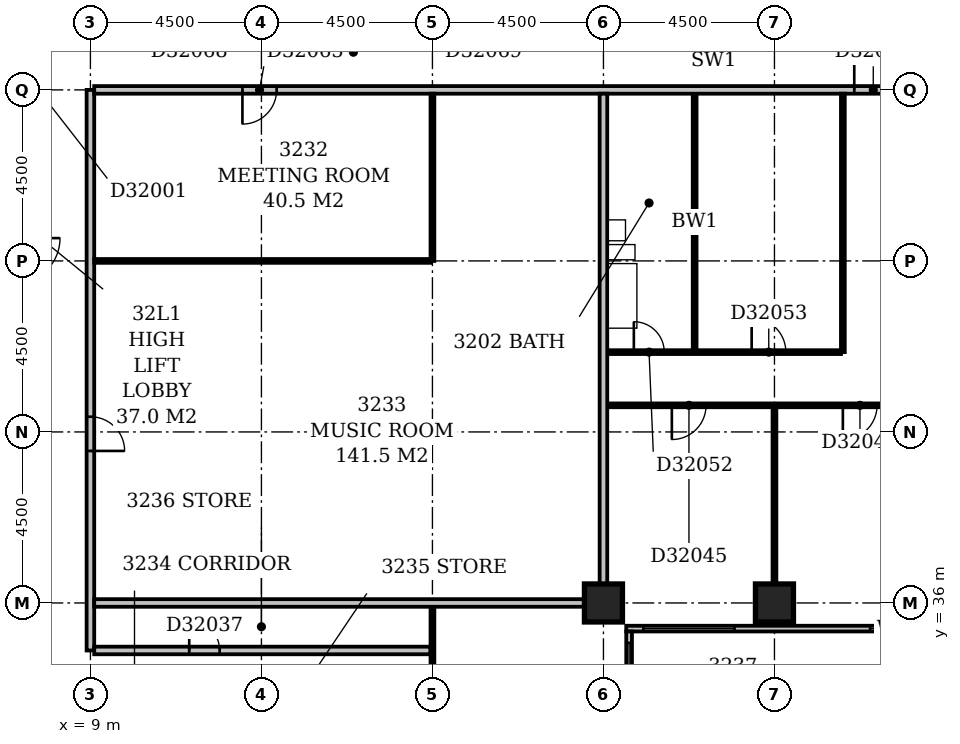
"""IFC4 building model, lengths in metres.
Left out: names, types, materials, properties, quantities, classifications, styles, units other than length and angle.
Written with IfcOpenShell. Run it as: python <this file> out.ifc"""

import sys

from ifc_helpers import new_model, si_unit, direction, frame, frame_2d, origin, origin_2d, place, context, subcontext, project, spatial, rectangle, extrude, element, fill, save


model = new_model("IFC4")
c1 = context("Model", 3, precision=1e-05, world=origin(), true_north=direction((0.0, 1.0)))
c2 = subcontext(c1, "Body", "Model", "MODEL_VIEW")
j1 = project(units=[si_unit("LENGTHUNIT", "METRE"), si_unit("PLANEANGLEUNIT", "RADIAN")], contexts=[c1])
p1 = place(None, origin())
s1 = spatial("IfcSite", under=j1, at=p1, CompositionType="ELEMENT")
p2 = place(p1, origin())
s2 = spatial("IfcBuilding", under=s1, at=p2, CompositionType="ELEMENT")
p3 = place(p2, frame((0.0, 0.0, 130.4)))
s3 = spatial("IfcBuildingStorey", under=s2, at=p3, CompositionType="ELEMENT", Elevation=130.4)
for number, where, z_axis, x_axis in (
    (1, (22.5, 36.0, -0.3), (0.0, 0.0, 1.0), (1.0, 0.0, 0.0)),
    (2, (27.0, 36.0, -0.3), (0.0, 0.0, 1.0), (1.0, 0.0, 0.0)),
):
    element("IfcColumn", number, at=place(p3, frame(where, z_axis=z_axis, x_axis=x_axis)), inside=s3, PredefinedType="COLUMN", context=c2, shape_type="SweptSolid", body=[
        extrude(rectangle(XDim=1.0, YDim=1.0, at=origin_2d()), origin(), (0.0, 0.0, 1.0), 3.6),
    ])
p4 = place(p3, frame((23.175, 17.4, 0.0), z_axis=(0.0, 0.0, 1.0), x_axis=(0.0, 1.0, 0.0)))
e3 = element("IfcWall", 3, at=p4, inside=s3, PredefinedType="STANDARD", context=c2, shape_type="SweptSolid", body=[
    extrude(rectangle(XDim=17.85, YDim=0.15, at=frame_2d((8.925, 0.0))), origin(), (0.0, 0.0, 1.0), 2.7),
])
p5 = place(p4, frame((1.65, 0.0, 0.6)))
e4 = element("IfcOpeningElement", 4, at=p5, cuts=e3, PredefinedType="OPENING", context=c2, shape_type="SweptSolid", body=[
    extrude(rectangle(XDim=2.4, YDim=1.8, at=frame_2d((1.2, 0.9))), frame((0.0, 0.087, 0.0), z_axis=(0.0, -1.0, 0.0), x_axis=(1.0, 0.0, 0.0)), (0.0, 0.0, 1.0), 0.174),
])
p6 = place(p4, frame((5.801, 0.0, 0.6)))
e5 = element("IfcOpeningElement", 5, at=p6, cuts=e3, PredefinedType="OPENING", context=c2, shape_type="SweptSolid", body=[
    extrude(rectangle(XDim=0.6, YDim=1.8, at=frame_2d((0.3, 0.9))), frame((0.0, 0.087, 0.0), z_axis=(0.0, -1.0, 0.0), x_axis=(1.0, 0.0, 0.0)), (0.0, 0.0, 1.0), 0.174),
])
p7 = place(p4, frame((10.65, 0.0, 0.6)))
e6 = element("IfcOpeningElement", 6, at=p7, cuts=e3, PredefinedType="OPENING", context=c2, shape_type="SweptSolid", body=[
    extrude(rectangle(XDim=2.4, YDim=1.8, at=frame_2d((1.2, 0.9))), frame((0.0, 0.087, 0.0), z_axis=(0.0, -1.0, 0.0), x_axis=(1.0, 0.0, 0.0)), (0.0, 0.0, 1.0), 0.174),
])
p8 = place(p4, frame((15.15, 0.0, 0.6)))
e7 = element("IfcOpeningElement", 7, at=p8, cuts=e3, PredefinedType="OPENING", context=c2, shape_type="SweptSolid", body=[
    extrude(rectangle(XDim=2.4, YDim=1.8, at=frame_2d((1.2, 0.9))), frame((0.0, 0.087, 0.0), z_axis=(0.0, -1.0, 0.0), x_axis=(1.0, 0.0, 0.0)), (0.0, 0.0, 1.0), 0.174),
])
p9 = place(p3, frame((23.1, 35.325, 0.0), z_axis=(0.0, 0.0, 1.0), x_axis=(1.0, 0.0, 0.0)))
e8 = element("IfcWall", 8, at=p9, inside=s3, PredefinedType="STANDARD", context=c2, shape_type="SweptSolid", body=[
    extrude(rectangle(XDim=45.15, YDim=0.15, at=frame_2d((22.575, 0.0))), origin(), (0.0, 0.0, 1.0), 2.7),
])
p10 = place(p9, frame((0.45, 0.0, 0.6)))
e9 = element("IfcOpeningElement", 9, at=p10, cuts=e8, PredefinedType="OPENING", context=c2, shape_type="SweptSolid", body=[
    extrude(rectangle(XDim=2.4, YDim=1.8, at=frame_2d((1.2, 0.9))), frame((0.0, 0.087, 0.0), z_axis=(0.0, -1.0, 0.0), x_axis=(1.0, 0.0, 0.0)), (0.0, 0.0, 1.0), 0.174),
])
p11 = place(p9, frame((6.417, 0.0, 0.6)))
e10 = element("IfcOpeningElement", 10, at=p11, cuts=e8, PredefinedType="OPENING", context=c2, shape_type="SweptSolid", body=[
    extrude(rectangle(XDim=1.2, YDim=1.8, at=frame_2d((0.6, 0.9))), frame((0.0, 0.087, 0.0), z_axis=(0.0, -1.0, 0.0), x_axis=(1.0, 0.0, 0.0)), (0.0, 0.0, 1.0), 0.174),
])
p12 = place(p9, frame((9.45, 0.0, 0.6)))
e11 = element("IfcOpeningElement", 11, at=p12, cuts=e8, PredefinedType="OPENING", context=c2, shape_type="SweptSolid", body=[
    extrude(rectangle(XDim=2.4, YDim=1.8, at=frame_2d((1.2, 0.9))), frame((0.0, 0.087, 0.0), z_axis=(0.0, -1.0, 0.0), x_axis=(1.0, 0.0, 0.0)), (0.0, 0.0, 1.0), 0.174),
])
p13 = place(p9, frame((13.95, 0.0, 0.6)))
e12 = element("IfcOpeningElement", 12, at=p13, cuts=e8, PredefinedType="OPENING", context=c2, shape_type="SweptSolid", body=[
    extrude(rectangle(XDim=2.4, YDim=1.8, at=frame_2d((1.2, 0.9))), frame((0.0, 0.087, 0.0), z_axis=(0.0, -1.0, 0.0), x_axis=(1.0, 0.0, 0.0)), (0.0, 0.0, 1.0), 0.174),
])
p14 = place(p9, frame((18.16, 0.0, 0.6)))
e13 = element("IfcOpeningElement", 13, at=p14, cuts=e8, PredefinedType="OPENING", context=c2, shape_type="SweptSolid", body=[
    extrude(rectangle(XDim=1.8, YDim=1.8, at=frame_2d((0.9, 0.9))), frame((0.0, 0.087, 0.0), z_axis=(0.0, -1.0, 0.0), x_axis=(1.0, 0.0, 0.0)), (0.0, 0.0, 1.0), 0.174),
])
p15 = place(p9, frame((22.95, 0.0, 0.6)))
e14 = element("IfcOpeningElement", 14, at=p15, cuts=e8, PredefinedType="OPENING", context=c2, shape_type="SweptSolid", body=[
    extrude(rectangle(XDim=2.4, YDim=1.8, at=frame_2d((1.2, 0.9))), frame((0.0, 0.087, 0.0), z_axis=(0.0, -1.0, 0.0), x_axis=(1.0, 0.0, 0.0)), (0.0, 0.0, 1.0), 0.174),
])
p16 = place(p9, frame((27.45, 0.0, 0.6)))
e15 = element("IfcOpeningElement", 15, at=p16, cuts=e8, PredefinedType="OPENING", context=c2, shape_type="SweptSolid", body=[
    extrude(rectangle(XDim=2.4, YDim=1.8, at=frame_2d((1.2, 0.9))), frame((0.0, 0.087, 0.0), z_axis=(0.0, -1.0, 0.0), x_axis=(1.0, 0.0, 0.0)), (0.0, 0.0, 1.0), 0.174),
])
p17 = place(p9, frame((31.631, 0.0, 0.6)))
e16 = element("IfcOpeningElement", 16, at=p17, cuts=e8, PredefinedType="OPENING", context=c2, shape_type="SweptSolid", body=[
    extrude(rectangle(XDim=0.9, YDim=1.8, at=frame_2d((0.45, 0.9))), frame((0.0, 0.087, 0.0), z_axis=(0.0, -1.0, 0.0), x_axis=(1.0, 0.0, 0.0)), (0.0, 0.0, 1.0), 0.174),
])
p18 = place(p9, frame((36.45, 0.0, 0.6)))
e17 = element("IfcOpeningElement", 17, at=p18, cuts=e8, PredefinedType="OPENING", context=c2, shape_type="SweptSolid", body=[
    extrude(rectangle(XDim=2.4, YDim=1.8, at=frame_2d((1.2, 0.9))), frame((0.0, 0.087, 0.0), z_axis=(0.0, -1.0, 0.0), x_axis=(1.0, 0.0, 0.0)), (0.0, 0.0, 1.0), 0.174),
])
p19 = place(p9, frame((40.95, 0.0, 0.6)))
e18 = element("IfcOpeningElement", 18, at=p19, cuts=e8, PredefinedType="OPENING", context=c2, shape_type="SweptSolid", body=[
    extrude(rectangle(XDim=2.4, YDim=1.8, at=frame_2d((1.2, 0.9))), frame((0.0, 0.087, 0.0), z_axis=(0.0, -1.0, 0.0), x_axis=(1.0, 0.0, 0.0)), (0.0, 0.0, 1.0), 0.174),
])
p20 = place(p3, frame((18.0, 31.6, 0.0), z_axis=(0.0, 0.0, 1.0), x_axis=(0.0, 1.0, 0.0)))
e19 = element("IfcWall", 19, at=p20, inside=s3, PredefinedType="PARTITIONING", context=c2, shape_type="SweptSolid", body=[
    extrude(rectangle(XDim=4.3, YDim=0.1, at=frame_2d((2.15, 0.0))), origin(), (0.0, 0.0, 1.0), 3.3),
])
p21 = place(p20, frame((1.7, 0.0, 0.0)))
e20 = element("IfcOpeningElement", 20, at=p21, cuts=e19, PredefinedType="OPENING", context=c2, shape_type="SweptSolid", body=[
    extrude(rectangle(XDim=0.9, YDim=2.1, at=frame_2d((0.45, 1.05))), frame((0.0, 0.062, 0.0), z_axis=(0.0, -1.0, 0.0), x_axis=(1.0, 0.0, 0.0)), (0.0, 0.0, 1.0), 0.124),
])
p22 = place(p3, frame((9.0, 34.75, 0.0), z_axis=(0.0, 0.0, 1.0), x_axis=(0.0, 1.0, 0.0)))
e21 = element("IfcWall", 21, at=p22, inside=s3, PredefinedType="PARTITIONING", context=c2, shape_type="SweptSolid", body=[
    extrude(rectangle(XDim=14.75, YDim=0.2, at=frame_2d((7.375, 0.0))), origin(), (0.0, 0.0, 1.0), 3.3),
])
p23 = place(p22, frame((5.25, 0.0, 0.0)))
e22 = element("IfcOpeningElement", 22, at=p23, cuts=e21, PredefinedType="OPENING", context=c2, shape_type="SweptSolid", body=[
    extrude(rectangle(XDim=0.9, YDim=2.1, at=frame_2d((0.45, 1.05))), frame((0.0, 0.112, 0.0), z_axis=(0.0, -1.0, 0.0), x_axis=(1.0, 0.0, 0.0)), (0.0, 0.0, 1.0), 0.224),
])
p24 = place(p3, frame((9.1, 34.75, 0.0), z_axis=(0.0, 0.0, 1.0), x_axis=(1.0, 0.0, 0.0)))
e23 = element("IfcWall", 23, at=p24, inside=s3, PredefinedType="PARTITIONING", context=c2, shape_type="SweptSolid", body=[
    extrude(rectangle(XDim=8.85, YDim=0.2, at=frame_2d((4.425, 0.0))), origin(), (0.0, 0.0, 1.0), 3.3),
])
p25 = place(p24, frame((2.5, 0.0, 0.0)))
e24 = element("IfcOpeningElement", 24, at=p25, cuts=e23, PredefinedType="OPENING", context=c2, shape_type="SweptSolid", body=[
    extrude(rectangle(XDim=0.8, YDim=2.1, at=frame_2d((0.4, 1.05))), frame((0.0, 0.112, 0.0), z_axis=(0.0, -1.0, 0.0), x_axis=(1.0, 0.0, 0.0)), (0.0, 0.0, 1.0), 0.224),
])
for number, where, z_axis, x_axis in (
    (25, (9.1, 36.0, 0.0), (0.0, 0.0, 1.0), (1.0, 0.0, 0.0)),
    (26, (22.5, 36.5, 0.0), (0.0, 0.0, 1.0), (0.0, 1.0, 0.0)),
):
    element("IfcWall", number, at=place(p3, frame(where, z_axis=z_axis, x_axis=x_axis)), inside=s3, PredefinedType="PARTITIONING", context=c2, shape_type="SweptSolid", body=[
        extrude(rectangle(XDim=12.9, YDim=0.2, at=frame_2d((6.45, 0.0))), origin(), (0.0, 0.0, 1.0), 3.3),
    ])
p26 = place(p3, frame((27.0, 36.5, 0.0), z_axis=(0.0, 0.0, 1.0), x_axis=(0.0, 1.0, 0.0)))
e27 = element("IfcWall", 27, at=p26, inside=s3, PredefinedType="PARTITIONING", context=c2, shape_type="SweptSolid", body=[
    extrude(rectangle(XDim=4.65, YDim=0.1, at=frame_2d((2.325, 0.0))), origin(), (0.0, 0.0, 1.0), 2.6),
])
p27 = place(p3, frame((22.6, 41.2, 0.0), z_axis=(0.0, 0.0, 1.0), x_axis=(1.0, 0.0, 0.0)))
e28 = element("IfcWall", 28, at=p27, inside=s3, PredefinedType="PARTITIONING", context=c2, shape_type="SweptSolid", body=[
    extrude(rectangle(XDim=13.3, YDim=0.1, at=frame_2d((6.65, 0.0))), origin(), (0.0, 0.0, 1.0), 3.3),
])
p28 = place(p27, frame((1.7, 0.0, 0.0)))
e29 = element("IfcOpeningElement", 29, at=p28, cuts=e28, PredefinedType="OPENING", context=c2, shape_type="SweptSolid", body=[
    extrude(rectangle(XDim=0.9, YDim=2.1, at=frame_2d((0.45, 1.05))), frame((0.0, 0.062, 0.0), z_axis=(0.0, -1.0, 0.0), x_axis=(1.0, 0.0, 0.0)), (0.0, 0.0, 1.0), 0.124),
])
p29 = place(p27, frame((6.2, 0.0, 0.0)))
e30 = element("IfcOpeningElement", 30, at=p29, cuts=e28, PredefinedType="OPENING", context=c2, shape_type="SweptSolid", body=[
    extrude(rectangle(XDim=0.9, YDim=2.1, at=frame_2d((0.45, 1.05))), frame((0.0, 0.062, 0.0), z_axis=(0.0, -1.0, 0.0), x_axis=(1.0, 0.0, 0.0)), (0.0, 0.0, 1.0), 0.124),
])
p30 = place(p27, frame((10.7, 0.0, 0.0)))
e31 = element("IfcOpeningElement", 31, at=p30, cuts=e28, PredefinedType="OPENING", context=c2, shape_type="SweptSolid", body=[
    extrude(rectangle(XDim=0.9, YDim=2.1, at=frame_2d((0.45, 1.05))), frame((0.0, 0.062, 0.0), z_axis=(0.0, -1.0, 0.0), x_axis=(1.0, 0.0, 0.0)), (0.0, 0.0, 1.0), 0.124),
])
p31 = place(p3, frame((22.6, 42.6, 0.0), z_axis=(0.0, 0.0, 1.0), x_axis=(1.0, 0.0, 0.0)))
e32 = element("IfcWall", 32, at=p31, inside=s3, PredefinedType="PARTITIONING", context=c2, shape_type="SweptSolid", body=[
    extrude(rectangle(XDim=6.15, YDim=0.1, at=frame_2d((3.075, 0.0))), origin(), (0.0, 0.0, 1.0), 3.3),
])
p32 = place(p31, frame((0.7, 0.0, 0.0)))
e33 = element("IfcOpeningElement", 33, at=p32, cuts=e32, PredefinedType="OPENING", context=c2, shape_type="SweptSolid", body=[
    extrude(rectangle(XDim=0.8, YDim=2.1, at=frame_2d((0.4, 1.05))), frame((0.0, 0.062, 0.0), z_axis=(0.0, -1.0, 0.0), x_axis=(1.0, 0.0, 0.0)), (0.0, 0.0, 1.0), 0.124),
])
p33 = place(p31, frame((3.8, 0.0, 0.0)))
e34 = element("IfcOpeningElement", 34, at=p33, cuts=e32, PredefinedType="OPENING", context=c2, shape_type="SweptSolid", body=[
    extrude(rectangle(XDim=0.9, YDim=2.1, at=frame_2d((0.45, 1.05))), frame((0.0, 0.062, 0.0), z_axis=(0.0, -1.0, 0.0), x_axis=(1.0, 0.0, 0.0)), (0.0, 0.0, 1.0), 0.124),
])
p34 = place(p3, frame((28.8, 42.6, 0.0), z_axis=(0.0, 0.0, 1.0), x_axis=(0.0, 1.0, 0.0)))
e35 = element("IfcWall", 35, at=p34, inside=s3, PredefinedType="PARTITIONING", context=c2, shape_type="SweptSolid", body=[
    extrude(rectangle(XDim=6.8, YDim=0.1, at=frame_2d((3.4, 0.0))), origin(), (0.0, 0.0, 1.0), 3.3),
])
p35 = place(p3, frame((24.9, 42.65, 0.0), z_axis=(0.0, 0.0, 1.0), x_axis=(0.0, 1.0, 0.0)))
e36 = element("IfcWall", 36, at=p35, inside=s3, PredefinedType="PLUMBINGWALL", context=c2, shape_type="SweptSolid", body=[
    extrude(rectangle(XDim=6.75, YDim=0.1, at=frame_2d((3.375, 0.0))), origin(), (0.0, 0.0, 1.0), 3.3),
])
p36 = place(p3, frame((9.1, 45.0, 0.0), z_axis=(0.0, 0.0, 1.0), x_axis=(1.0, 0.0, 0.0)))
e37 = element("IfcWall", 37, at=p36, inside=s3, PredefinedType="PARTITIONING", context=c2, shape_type="SweptSolid", body=[
    extrude(rectangle(XDim=8.85, YDim=0.1, at=frame_2d((4.425, 0.0))), origin(), (0.0, 0.0, 1.0), 3.3),
])
p37 = place(p3, frame((18.0, 45.0, 0.0), z_axis=(0.0, 0.0, 1.0), x_axis=(0.0, 1.0, 0.0)))
e38 = element("IfcWall", 38, at=p37, inside=s3, PredefinedType="PARTITIONING", context=c2, shape_type="SweptSolid", body=[
    extrude(rectangle(XDim=4.4, YDim=0.1, at=frame_2d((2.2, 0.0))), origin(), (0.0, 0.0, 1.0), 3.3),
])
p38 = place(p3, frame((9.1, 49.5, 0.0), z_axis=(0.0, 0.0, 1.0), x_axis=(1.0, 0.0, 0.0)))
e39 = element("IfcWall", 39, at=p38, inside=s3, PredefinedType="PARTITIONING", context=c2, shape_type="SweptSolid", body=[
    extrude(rectangle(XDim=28.05, YDim=0.2, at=frame_2d((14.025, 0.0))), origin(), (0.0, 0.0, 1.0), 3.3),
])
p39 = place(p38, frame((20.0, 0.0, 0.0)))
e40 = element("IfcOpeningElement", 40, at=p39, cuts=e39, PredefinedType="OPENING", context=c2, shape_type="SweptSolid", body=[
    extrude(rectangle(XDim=1.0, YDim=2.1, at=frame_2d((0.5, 1.05))), frame((0.0, 0.112, 0.0), z_axis=(0.0, -1.0, 0.0), x_axis=(1.0, 0.0, 0.0)), (0.0, 0.0, 1.0), 0.224),
])
p40 = place(p38, frame((3.9, 0.0, 0.0)))
e41 = element("IfcOpeningElement", 41, at=p40, cuts=e39, PredefinedType="OPENING", context=c2, shape_type="SweptSolid", body=[
    extrude(rectangle(XDim=0.9, YDim=2.1, at=frame_2d((0.45, 1.05))), frame((0.0, 0.112, 0.0), z_axis=(0.0, -1.0, 0.0), x_axis=(1.0, 0.0, 0.0)), (0.0, 0.0, 1.0), 0.224),
])
p41 = place(p8, origin())
e42 = element("IfcWindow", 42, at=p41, inside=s3, PartitioningType="SINGLE_PANEL", PredefinedType="WINDOW", context=c2, shape_type="SweptSolid", body=[
    extrude(rectangle(XDim=2.4, YDim=1.8, at=frame_2d((1.2, 0.9))), frame((0.0, 0.03, 0.0), z_axis=(0.0, -1.0, 0.0), x_axis=(1.0, 0.0, 0.0)), (0.0, 0.0, 1.0), 0.06),
])
fill(e7, e42)
p42 = place(p10, origin())
e43 = element("IfcWindow", 43, at=p42, inside=s3, PartitioningType="SINGLE_PANEL", PredefinedType="WINDOW", context=c2, shape_type="SweptSolid", body=[
    extrude(rectangle(XDim=2.4, YDim=1.8, at=frame_2d((1.2, 0.9))), frame((0.0, 0.03, 0.0), z_axis=(0.0, -1.0, 0.0), x_axis=(1.0, 0.0, 0.0)), (0.0, 0.0, 1.0), 0.06),
])
fill(e9, e43)
p43 = place(p11, origin())
e44 = element("IfcWindow", 44, at=p43, inside=s3, PartitioningType="SINGLE_PANEL", PredefinedType="WINDOW", context=c2, shape_type="SweptSolid", body=[
    extrude(rectangle(XDim=1.2, YDim=1.8, at=frame_2d((0.6, 0.9))), frame((0.0, 0.03, 0.0), z_axis=(0.0, -1.0, 0.0), x_axis=(1.0, 0.0, 0.0)), (0.0, 0.0, 1.0), 0.06),
])
fill(e10, e44)
p44 = place(p23, frame((0.9, 0.0, 0.0), z_axis=(0.0, 0.0, 1.0), x_axis=(-1.0, 0.0, 0.0)))
e45 = element("IfcDoor", 45, at=p44, inside=s3, OperationType="SINGLE_SWING_RIGHT", PredefinedType="DOOR", context=c2, shape_type="SweptSolid", body=[
    extrude(rectangle(XDim=0.9, YDim=2.1, at=frame_2d((0.45, 1.05))), frame((0.0, 0.025, 0.0), z_axis=(0.0, -1.0, 0.0), x_axis=(1.0, 0.0, 0.0)), (0.0, 0.0, 1.0), 0.05),
])
fill(e22, e45)
p45 = place(p25, origin())
e46 = element("IfcDoor", 46, at=p45, inside=s3, OperationType="SINGLE_SWING_LEFT", PredefinedType="DOOR", context=c2, shape_type="SweptSolid", body=[
    extrude(rectangle(XDim=0.8, YDim=2.1, at=frame_2d((0.4, 1.05))), frame((0.0, 0.025, 0.0), z_axis=(0.0, -1.0, 0.0), x_axis=(1.0, 0.0, 0.0)), (0.0, 0.0, 1.0), 0.05),
])
fill(e24, e46)
p46 = place(p28, frame((0.9, 0.0, 0.0), z_axis=(0.0, 0.0, 1.0), x_axis=(-1.0, 0.0, 0.0)))
e47 = element("IfcDoor", 47, at=p46, inside=s3, OperationType="SINGLE_SWING_RIGHT", PredefinedType="DOOR", context=c2, shape_type="SweptSolid", body=[
    extrude(rectangle(XDim=0.9, YDim=2.1, at=frame_2d((0.45, 1.05))), frame((0.0, 0.025, 0.0), z_axis=(0.0, -1.0, 0.0), x_axis=(1.0, 0.0, 0.0)), (0.0, 0.0, 1.0), 0.05),
])
fill(e29, e47)
p47 = place(p29, frame((0.9, 0.0, 0.0), z_axis=(0.0, 0.0, 1.0), x_axis=(-1.0, 0.0, 0.0)))
e48 = element("IfcDoor", 48, at=p47, inside=s3, OperationType="SINGLE_SWING_RIGHT", PredefinedType="DOOR", context=c2, shape_type="SweptSolid", body=[
    extrude(rectangle(XDim=0.9, YDim=2.1, at=frame_2d((0.45, 1.05))), frame((0.0, 0.025, 0.0), z_axis=(0.0, -1.0, 0.0), x_axis=(1.0, 0.0, 0.0)), (0.0, 0.0, 1.0), 0.05),
])
fill(e30, e48)
p48 = place(p32, origin())
e49 = element("IfcDoor", 49, at=p48, inside=s3, OperationType="SINGLE_SWING_LEFT", PredefinedType="DOOR", context=c2, shape_type="SweptSolid", body=[
    extrude(rectangle(XDim=0.8, YDim=2.1, at=frame_2d((0.4, 1.05))), frame((0.0, 0.025, 0.0), z_axis=(0.0, -1.0, 0.0), x_axis=(1.0, 0.0, 0.0)), (0.0, 0.0, 1.0), 0.05),
])
fill(e33, e49)
p49 = place(p33, origin())
e50 = element("IfcDoor", 50, at=p49, inside=s3, OperationType="SINGLE_SWING_LEFT", PredefinedType="DOOR", context=c2, shape_type="SweptSolid", body=[
    extrude(rectangle(XDim=0.9, YDim=2.1, at=frame_2d((0.45, 1.05))), frame((0.0, 0.025, 0.0), z_axis=(0.0, -1.0, 0.0), x_axis=(1.0, 0.0, 0.0)), (0.0, 0.0, 1.0), 0.05),
])
fill(e34, e50)
p50 = place(p39, origin())
e51 = element("IfcDoor", 51, at=p50, inside=s3, OperationType="SINGLE_SWING_LEFT", PredefinedType="DOOR", context=c2, shape_type="SweptSolid", body=[
    extrude(rectangle(XDim=1.0, YDim=2.1, at=frame_2d((0.5, 1.05))), frame((0.0, 0.025, 0.0), z_axis=(0.0, -1.0, 0.0), x_axis=(1.0, 0.0, 0.0)), (0.0, 0.0, 1.0), 0.05),
])
fill(e40, e51)
p51 = place(p40, frame((0.9, 0.0, 0.0), z_axis=(0.0, 0.0, 1.0), x_axis=(-1.0, 0.0, 0.0)))
e52 = element("IfcDoor", 52, at=p51, inside=s3, OperationType="SINGLE_SWING_RIGHT", PredefinedType="DOOR", context=c2, shape_type="SweptSolid", body=[
    extrude(rectangle(XDim=0.9, YDim=2.1, at=frame_2d((0.45, 1.05))), frame((0.0, 0.025, 0.0), z_axis=(0.0, -1.0, 0.0), x_axis=(1.0, 0.0, 0.0)), (0.0, 0.0, 1.0), 0.05),
])
fill(e41, e52)
save(model, sys.argv[1])
